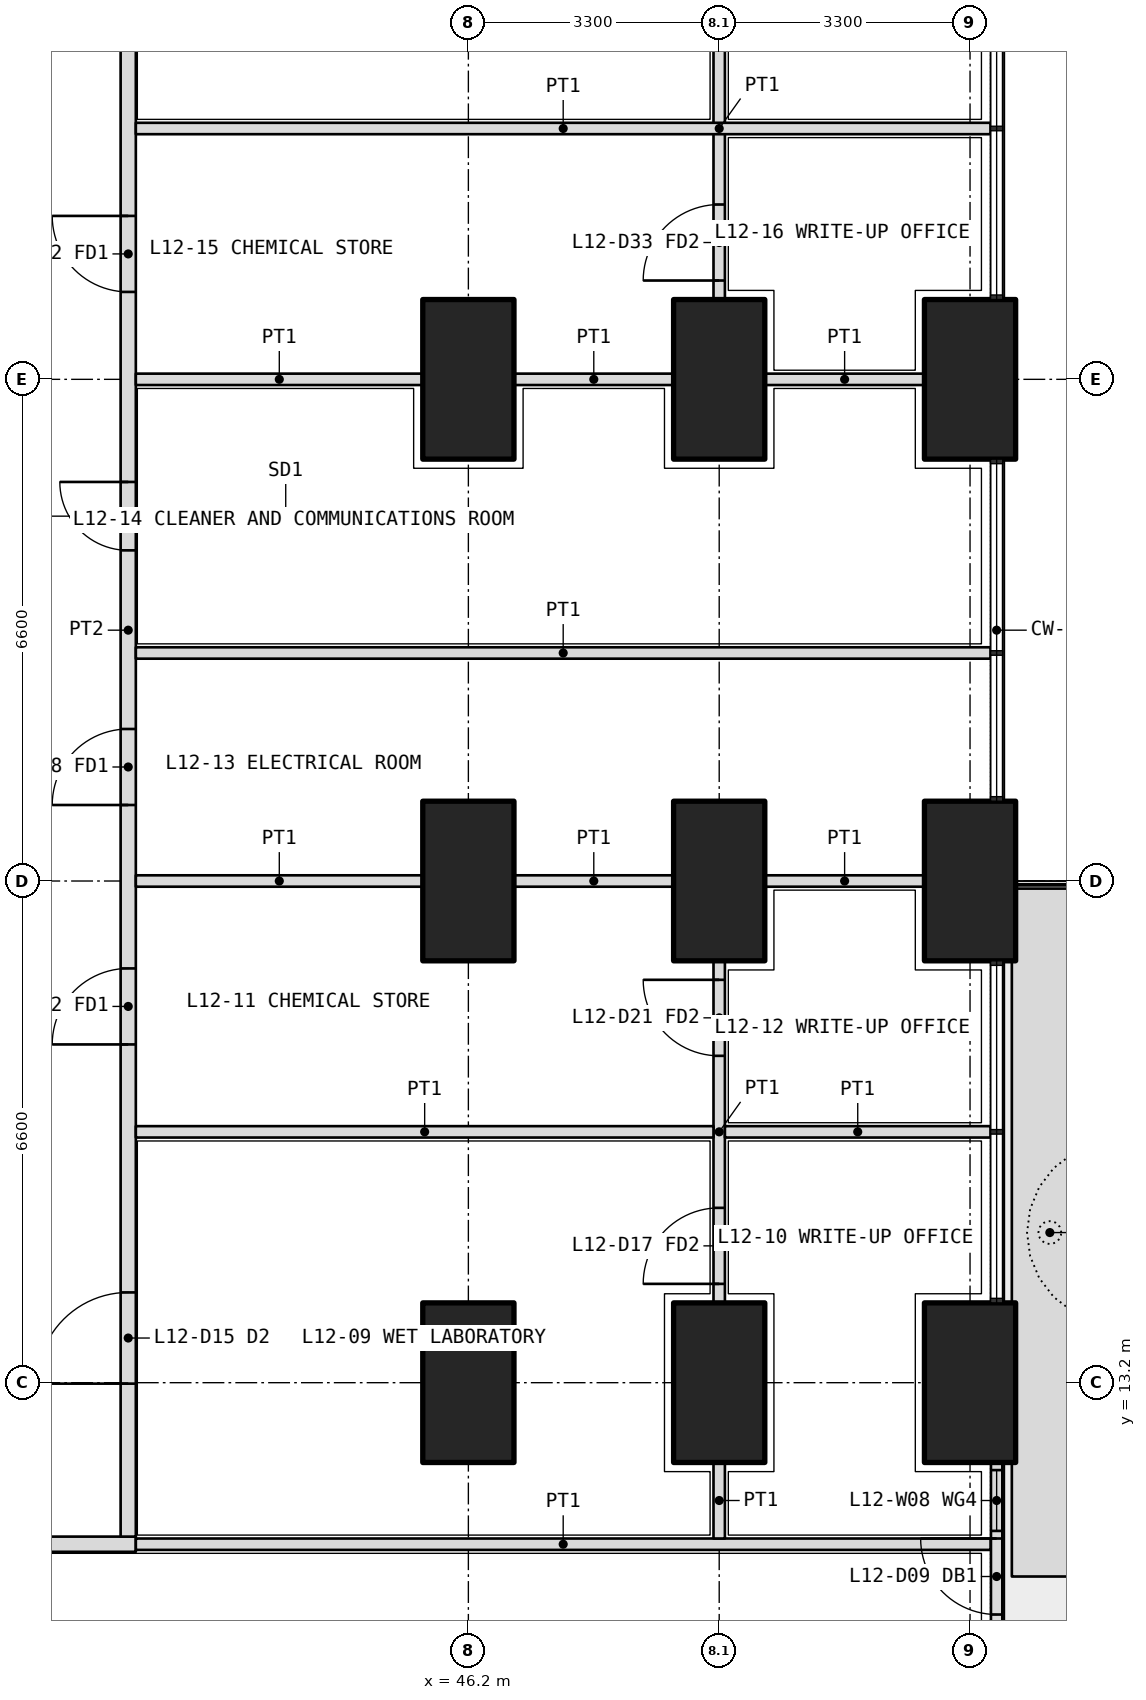
"""IFC4 building model, lengths in metres.
Left out: names, types, materials, properties, quantities, classifications, styles, units other than length and angle.
Written with IfcOpenShell. Run it as: python <this file> out.ifc"""

import sys

from ifc_helpers import new_model, si_unit, direction, frame, frame_2d, origin, origin_2d, place, context, subcontext, project, spatial, polyline, rectangle, outline, extrude, element, fill, save


model = new_model("IFC4")
c1 = context("Model", 3, precision=1e-05, world=origin(), true_north=direction((0.0, 1.0)))
c2 = subcontext(c1, "Body", "Model", "MODEL_VIEW")
j1 = project(units=[si_unit("LENGTHUNIT", "METRE"), si_unit("PLANEANGLEUNIT", "RADIAN")], contexts=[c1])
p1 = place(None, origin())
s1 = spatial("IfcSite", under=j1, at=p1, CompositionType="ELEMENT")
p2 = place(p1, origin())
s2 = spatial("IfcBuilding", under=s1, at=p2, CompositionType="ELEMENT")
p3 = place(p2, frame((0.0, 0.0, 54.9)))
s3 = spatial("IfcBuildingStorey", under=s2, at=p3, CompositionType="ELEMENT", Elevation=54.9)
for number, where, z_axis, x_axis in (
    (1, (52.8, 13.2, 0.0), (0.0, 0.0, 1.0), (0.0, 1.0, 0.0)),
    (2, (52.8, 19.8, 0.0), (0.0, 0.0, 1.0), (0.0, 1.0, 0.0)),
    (3, (52.8, 26.4, 0.0), (0.0, 0.0, 1.0), (0.0, 1.0, 0.0)),
    (4, (49.5, 13.2, 0.0), (0.0, 0.0, 1.0), (0.0, 1.0, 0.0)),
    (5, (49.5, 19.8, 0.0), (0.0, 0.0, 1.0), (0.0, 1.0, 0.0)),
    (6, (49.5, 26.4, 0.0), (0.0, 0.0, 1.0), (0.0, 1.0, 0.0)),
    (7, (46.2, 13.2, 0.0), (0.0, 0.0, 1.0), (0.0, 1.0, 0.0)),
    (8, (46.2, 19.8, 0.0), (0.0, 0.0, 1.0), (0.0, 1.0, 0.0)),
    (9, (46.2, 26.4, 0.0), (0.0, 0.0, 1.0), (0.0, 1.0, 0.0)),
):
    element("IfcColumn", number, at=place(p3, frame(where, z_axis=z_axis, x_axis=x_axis)), inside=s3, PredefinedType="COLUMN", context=c2, shape_type="SweptSolid", body=[
        extrude(rectangle(XDim=2.1, YDim=1.2, at=origin_2d()), origin(), (0.0, 0.0, 1.0), 4.2),
    ])
p4 = place(p3, origin())
e10 = element("IfcWall", 10, at=p4, inside=s3, PredefinedType="USERDEFINED", context=c2, shape_type="SweptSolid", body=[
    extrude(outline(polyline([(53.35, 10.65), (54.35, 10.65), (54.35, 19.7), (53.35, 19.7), (53.35, 10.65)]), holes=[polyline([(53.5, 10.8), (54.2, 10.8), (54.2, 19.55), (53.5, 19.55), (53.5, 10.8)])]), origin(), (0.0, 0.0, 1.0), 1.05),
])
p5 = place(p3, frame((53.15, 7.65, 0.0), z_axis=(0.0, 0.0, 1.0), x_axis=(0.0, 1.0, 0.0)))
e11 = element("IfcWall", 11, at=p5, inside=s3, PredefinedType="SOLIDWALL", context=c2, shape_type="SweptSolid", body=[
    extrude(rectangle(XDim=4.5, YDim=0.15, at=frame_2d((2.25, 0.0))), origin(), (0.0, 0.0, 1.0), 2.7),
])
p6 = place(p5, frame((2.5, 0.0, 0.0)))
e12 = element("IfcOpeningElement", 12, at=p6, cuts=e11, PredefinedType="OPENING", context=c2, shape_type="SweptSolid", body=[
    extrude(rectangle(XDim=1.0, YDim=2.4, at=frame_2d((0.5, 1.2))), frame((0.0, 0.085, 0.0), z_axis=(0.0, -1.0, 0.0), x_axis=(1.0, 0.0, 0.0)), (0.0, 0.0, 1.0), 0.17),
])
p7 = place(p5, frame((0.1, 0.0, 0.1)))
e13 = element("IfcOpeningElement", 13, at=p7, cuts=e11, PredefinedType="OPENING", context=c2, shape_type="SweptSolid", body=[
    extrude(rectangle(XDim=1.9, YDim=2.3, at=frame_2d((0.95, 1.15))), frame((0.0, 0.085, 0.0), z_axis=(0.0, -1.0, 0.0), x_axis=(1.0, 0.0, 0.0)), (0.0, 0.0, 1.0), 0.17),
])
p8 = place(p5, frame((3.6, 0.0, 0.1)))
e14 = element("IfcOpeningElement", 14, at=p8, cuts=e11, PredefinedType="OPENING", context=c2, shape_type="SweptSolid", body=[
    extrude(rectangle(XDim=0.8, YDim=2.3, at=frame_2d((0.4, 1.15))), frame((0.0, 0.085, 0.0), z_axis=(0.0, -1.0, 0.0), x_axis=(1.0, 0.0, 0.0)), (0.0, 0.0, 1.0), 0.17),
])
p9 = place(p3, frame((26.4, 11.075, 0.0), z_axis=(0.0, 0.0, 1.0), x_axis=(1.0, 0.0, 0.0)))
e15 = element("IfcWall", 15, at=p9, inside=s3, PredefinedType="PARTITIONING", context=c2, shape_type="SweptSolid", body=[
    extrude(rectangle(XDim=15.425, YDim=0.2, at=frame_2d((7.712, 0.0))), origin(), (0.0, 0.0, 1.0), 2.85),
])
p10 = place(p9, frame((1.6, 0.0, 0.0)))
e16 = element("IfcOpeningElement", 16, at=p10, cuts=e15, PredefinedType="OPENING", context=c2, shape_type="SweptSolid", body=[
    extrude(rectangle(XDim=1.0, YDim=2.1, at=frame_2d((0.5, 1.05))), frame((0.0, 0.11, 0.0), z_axis=(0.0, -1.0, 0.0), x_axis=(1.0, 0.0, 0.0)), (0.0, 0.0, 1.0), 0.22),
])
p11 = place(p9, frame((4.9, 0.0, 0.0)))
e17 = element("IfcOpeningElement", 17, at=p11, cuts=e15, PredefinedType="OPENING", context=c2, shape_type="SweptSolid", body=[
    extrude(rectangle(XDim=1.0, YDim=2.1, at=frame_2d((0.5, 1.05))), frame((0.0, 0.11, 0.0), z_axis=(0.0, -1.0, 0.0), x_axis=(1.0, 0.0, 0.0)), (0.0, 0.0, 1.0), 0.22),
])
p12 = place(p9, frame((10.363, 0.0, 0.0)))
e18 = element("IfcOpeningElement", 18, at=p12, cuts=e15, PredefinedType="OPENING", context=c2, shape_type="SweptSolid", body=[
    extrude(rectangle(XDim=1.2, YDim=2.1, at=frame_2d((0.6, 1.05))), frame((0.0, 0.11, 0.0), z_axis=(0.0, -1.0, 0.0), x_axis=(1.0, 0.0, 0.0)), (0.0, 0.0, 1.0), 0.22),
])
p13 = place(p3, frame((41.725, 11.175, 0.0), z_axis=(0.0, 0.0, 1.0), x_axis=(0.0, 1.0, 0.0)))
e19 = element("IfcWall", 19, at=p13, inside=s3, PredefinedType="PARTITIONING", context=c2, shape_type="SweptSolid", body=[
    extrude(rectangle(XDim=23.85, YDim=0.2, at=frame_2d((11.925, 0.0))), origin(), (0.0, 0.0, 1.0), 2.85),
])
p14 = place(p13, frame((2.012, 0.0, 0.0)))
e20 = element("IfcOpeningElement", 20, at=p14, cuts=e19, PredefinedType="OPENING", context=c2, shape_type="SweptSolid", body=[
    extrude(rectangle(XDim=1.2, YDim=2.1, at=frame_2d((0.6, 1.05))), frame((0.0, 0.11, 0.0), z_axis=(0.0, -1.0, 0.0), x_axis=(1.0, 0.0, 0.0)), (0.0, 0.0, 1.0), 0.22),
])
p15 = place(p13, frame((6.475, 0.0, 0.0)))
e21 = element("IfcOpeningElement", 21, at=p15, cuts=e19, PredefinedType="OPENING", context=c2, shape_type="SweptSolid", body=[
    extrude(rectangle(XDim=1.0, YDim=2.1, at=frame_2d((0.5, 1.05))), frame((0.0, 0.11, 0.0), z_axis=(0.0, -1.0, 0.0), x_axis=(1.0, 0.0, 0.0)), (0.0, 0.0, 1.0), 0.22),
])
p16 = place(p13, frame((9.625, 0.0, 0.0)))
e22 = element("IfcOpeningElement", 22, at=p16, cuts=e19, PredefinedType="OPENING", context=c2, shape_type="SweptSolid", body=[
    extrude(rectangle(XDim=1.0, YDim=2.1, at=frame_2d((0.5, 1.05))), frame((0.0, 0.11, 0.0), z_axis=(0.0, -1.0, 0.0), x_axis=(1.0, 0.0, 0.0)), (0.0, 0.0, 1.0), 0.22),
])
p17 = place(p13, frame((12.975, 0.0, 0.0)))
e23 = element("IfcOpeningElement", 23, at=p17, cuts=e19, PredefinedType="OPENING", context=c2, shape_type="SweptSolid", body=[
    extrude(rectangle(XDim=0.9, YDim=2.1, at=frame_2d((0.45, 1.05))), frame((0.0, 0.11, 0.0), z_axis=(0.0, -1.0, 0.0), x_axis=(1.0, 0.0, 0.0)), (0.0, 0.0, 1.0), 0.22),
])
p18 = place(p13, frame((16.375, 0.0, 0.0)))
e24 = element("IfcOpeningElement", 24, at=p18, cuts=e19, PredefinedType="OPENING", context=c2, shape_type="SweptSolid", body=[
    extrude(rectangle(XDim=1.0, YDim=2.1, at=frame_2d((0.5, 1.05))), frame((0.0, 0.11, 0.0), z_axis=(0.0, -1.0, 0.0), x_axis=(1.0, 0.0, 0.0)), (0.0, 0.0, 1.0), 0.22),
])
p19 = place(p13, frame((20.738, 0.0, 0.0)))
e25 = element("IfcOpeningElement", 25, at=p19, cuts=e19, PredefinedType="OPENING", context=c2, shape_type="SweptSolid", body=[
    extrude(rectangle(XDim=1.0, YDim=2.1, at=frame_2d((0.5, 1.05))), frame((0.0, 0.11, 0.0), z_axis=(0.0, -1.0, 0.0), x_axis=(1.0, 0.0, 0.0)), (0.0, 0.0, 1.0), 0.22),
])
p20 = place(p3, frame((53.07, 11.075, 0.0), z_axis=(0.0, 0.0, 1.0), x_axis=(-1.0, 0.0, 0.0)))
e26 = element("IfcWall", 26, at=p20, inside=s3, PredefinedType="PARTITIONING", context=c2, shape_type="SweptSolid", body=[
    extrude(rectangle(XDim=11.245, YDim=0.15, at=frame_2d((5.623, 0.0))), origin(), (0.0, 0.0, 1.0), 2.7),
])
p21 = place(p3, frame((49.5, 11.15, 0.0), z_axis=(0.0, 0.0, 1.0), x_axis=(0.0, 1.0, 0.0)))
e27 = element("IfcWall", 27, at=p21, inside=s3, PredefinedType="PARTITIONING", context=c2, shape_type="SweptSolid", body=[
    extrude(rectangle(XDim=1.0, YDim=0.15, at=frame_2d((0.5, 0.0))), origin(), (0.0, 0.0, 1.0), 3.9),
])
p22 = place(p3, frame((49.5, 14.25, 0.0), z_axis=(0.0, 0.0, 1.0), x_axis=(0.0, 1.0, 0.0)))
e28 = element("IfcWall", 28, at=p22, inside=s3, PredefinedType="PARTITIONING", context=c2, shape_type="SweptSolid", body=[
    extrude(rectangle(XDim=4.5, YDim=0.15, at=frame_2d((2.25, 0.0))), origin(), (0.0, 0.0, 1.0), 3.9),
])
p23 = place(p22, frame((0.25, 0.0, 0.0)))
e29 = element("IfcOpeningElement", 29, at=p23, cuts=e28, PredefinedType="OPENING", context=c2, shape_type="SweptSolid", body=[
    extrude(rectangle(XDim=1.0, YDim=2.1, at=frame_2d((0.5, 1.05))), frame((0.0, 0.085, 0.0), z_axis=(0.0, -1.0, 0.0), x_axis=(1.0, 0.0, 0.0)), (0.0, 0.0, 1.0), 0.17),
])
p24 = place(p22, frame((3.25, 0.0, 0.0)))
e30 = element("IfcOpeningElement", 30, at=p24, cuts=e28, PredefinedType="OPENING", context=c2, shape_type="SweptSolid", body=[
    extrude(rectangle(XDim=1.0, YDim=2.1, at=frame_2d((0.5, 1.05))), frame((0.0, 0.085, 0.0), z_axis=(0.0, -1.0, 0.0), x_axis=(1.0, 0.0, 0.0)), (0.0, 0.0, 1.0), 0.17),
])
p25 = place(p3, frame((49.5, 27.45, 0.0), z_axis=(0.0, 0.0, 1.0), x_axis=(0.0, 1.0, 0.0)))
e31 = element("IfcWall", 31, at=p25, inside=s3, PredefinedType="PARTITIONING", context=c2, shape_type="SweptSolid", body=[
    extrude(rectangle(XDim=4.5, YDim=0.15, at=frame_2d((2.25, 0.0))), origin(), (0.0, 0.0, 1.0), 3.9),
])
p26 = place(p25, frame((0.25, 0.0, 0.0)))
e32 = element("IfcOpeningElement", 32, at=p26, cuts=e31, PredefinedType="OPENING", context=c2, shape_type="SweptSolid", body=[
    extrude(rectangle(XDim=1.0, YDim=2.1, at=frame_2d((0.5, 1.05))), frame((0.0, 0.085, 0.0), z_axis=(0.0, -1.0, 0.0), x_axis=(1.0, 0.0, 0.0)), (0.0, 0.0, 1.0), 0.17),
])
p27 = place(p3, frame((53.07, 22.8, 0.0), z_axis=(0.0, 0.0, 1.0), x_axis=(-1.0, 0.0, 0.0)))
e33 = element("IfcWall", 33, at=p27, inside=s3, PredefinedType="PARTITIONING", context=c2, shape_type="SweptSolid", body=[
    extrude(rectangle(XDim=11.245, YDim=0.15, at=frame_2d((5.623, 0.0))), origin(), (0.0, 0.0, 1.0), 2.7),
])
for number, where, z_axis, x_axis in (
    (34, (52.2, 26.4, 0.0), (0.0, 0.0, 1.0), (-1.0, 0.0, 0.0)),
    (35, (48.9, 26.4, 0.0), (0.0, 0.0, 1.0), (-1.0, 0.0, 0.0)),
):
    element("IfcWall", number, at=place(p3, frame(where, z_axis=z_axis, x_axis=x_axis)), inside=s3, PredefinedType="PARTITIONING", context=c2, shape_type="SweptSolid", body=[
        extrude(rectangle(XDim=2.1, YDim=0.15, at=frame_2d((1.05, 0.0))), origin(), (0.0, 0.0, 1.0), 2.85),
    ])
p28 = place(p3, frame((45.6, 26.4, 0.0), z_axis=(0.0, 0.0, 1.0), x_axis=(-1.0, 0.0, 0.0)))
e36 = element("IfcWall", 36, at=p28, inside=s3, PredefinedType="PARTITIONING", context=c2, shape_type="SweptSolid", body=[
    extrude(rectangle(XDim=3.775, YDim=0.15, at=frame_2d((1.888, 0.0))), origin(), (0.0, 0.0, 1.0), 2.85),
])
p29 = place(p3, frame((53.07, 16.5, 0.0), z_axis=(0.0, 0.0, 1.0), x_axis=(-1.0, 0.0, 0.0)))
e37 = element("IfcWall", 37, at=p29, inside=s3, PredefinedType="PARTITIONING", context=c2, shape_type="SweptSolid", body=[
    extrude(rectangle(XDim=3.495, YDim=0.15, at=frame_2d((1.748, 0.0))), origin(), (0.0, 0.0, 1.0), 2.7),
])
p30 = place(p3, frame((49.425, 16.5, 0.0), z_axis=(0.0, 0.0, 1.0), x_axis=(-1.0, 0.0, 0.0)))
e38 = element("IfcWall", 38, at=p30, inside=s3, PredefinedType="PARTITIONING", context=c2, shape_type="SweptSolid", body=[
    extrude(rectangle(XDim=7.6, YDim=0.15, at=frame_2d((3.8, 0.0))), origin(), (0.0, 0.0, 1.0), 3.9),
])
for number, where, z_axis, x_axis in (
    (39, (52.2, 19.8, 0.0), (0.0, 0.0, 1.0), (-1.0, 0.0, 0.0)),
    (40, (48.9, 19.8, 0.0), (0.0, 0.0, 1.0), (-1.0, 0.0, 0.0)),
):
    element("IfcWall", number, at=place(p3, frame(where, z_axis=z_axis, x_axis=x_axis)), inside=s3, PredefinedType="PARTITIONING", context=c2, shape_type="SweptSolid", body=[
        extrude(rectangle(XDim=2.1, YDim=0.15, at=frame_2d((1.05, 0.0))), origin(), (0.0, 0.0, 1.0), 2.85),
    ])
p31 = place(p3, frame((45.6, 19.8, 0.0), z_axis=(0.0, 0.0, 1.0), x_axis=(-1.0, 0.0, 0.0)))
e41 = element("IfcWall", 41, at=p31, inside=s3, PredefinedType="PARTITIONING", context=c2, shape_type="SweptSolid", body=[
    extrude(rectangle(XDim=3.775, YDim=0.15, at=frame_2d((1.888, 0.0))), origin(), (0.0, 0.0, 1.0), 2.85),
])
p32 = place(p3, frame((53.07, 29.7, 0.0), z_axis=(0.0, 0.0, 1.0), x_axis=(-1.0, 0.0, 0.0)))
e42 = element("IfcWall", 42, at=p32, inside=s3, PredefinedType="PARTITIONING", context=c2, shape_type="SweptSolid", body=[
    extrude(rectangle(XDim=11.245, YDim=0.15, at=frame_2d((5.623, 0.0))), origin(), (0.0, 0.0, 1.0), 2.7),
])
p33 = place(p6, origin())
e43 = element("IfcDoor", 43, at=p33, inside=s3, OperationType="SINGLE_SWING_RIGHT", PredefinedType="DOOR", context=c2, shape_type="SweptSolid", body=[
    extrude(rectangle(XDim=1.0, YDim=2.4, at=frame_2d((0.5, 1.2))), frame((0.0, 0.025, 0.0), z_axis=(0.0, -1.0, 0.0), x_axis=(1.0, 0.0, 0.0)), (0.0, 0.0, 1.0), 0.05),
])
fill(e12, e43)
p34 = place(p8, origin())
e44 = element("IfcWindow", 44, at=p34, inside=s3, PartitioningType="SINGLE_PANEL", PredefinedType="WINDOW", context=c2, shape_type="SweptSolid", body=[
    extrude(rectangle(XDim=0.8, YDim=2.3, at=frame_2d((0.4, 1.15))), frame((0.0, 0.03, 0.0), z_axis=(0.0, -1.0, 0.0), x_axis=(1.0, 0.0, 0.0)), (0.0, 0.0, 1.0), 0.06),
])
fill(e14, e44)
p35 = place(p14, origin())
e45 = element("IfcDoor", 45, at=p35, inside=s3, OperationType="DOUBLE_DOOR_SINGLE_SWING", PredefinedType="DOOR", context=c2, shape_type="SweptSolid", body=[
    extrude(rectangle(XDim=1.2, YDim=2.1, at=frame_2d((0.6, 1.05))), frame((0.0, 0.025, 0.0), z_axis=(0.0, -1.0, 0.0), x_axis=(1.0, 0.0, 0.0)), (0.0, 0.0, 1.0), 0.05),
])
fill(e20, e45)
p36 = place(p23, origin())
e46 = element("IfcDoor", 46, at=p36, inside=s3, OperationType="SINGLE_SWING_LEFT", PredefinedType="DOOR", context=c2, shape_type="SweptSolid", body=[
    extrude(rectangle(XDim=1.0, YDim=2.1, at=frame_2d((0.5, 1.05))), frame((0.0, 0.025, 0.0), z_axis=(0.0, -1.0, 0.0), x_axis=(1.0, 0.0, 0.0)), (0.0, 0.0, 1.0), 0.05),
])
fill(e29, e46)
p37 = place(p15, origin())
e47 = element("IfcDoor", 47, at=p37, inside=s3, OperationType="SINGLE_SWING_LEFT", PredefinedType="DOOR", context=c2, shape_type="SweptSolid", body=[
    extrude(rectangle(XDim=1.0, YDim=2.1, at=frame_2d((0.5, 1.05))), frame((0.0, 0.025, 0.0), z_axis=(0.0, -1.0, 0.0), x_axis=(1.0, 0.0, 0.0)), (0.0, 0.0, 1.0), 0.05),
])
fill(e21, e47)
p38 = place(p24, origin())
e48 = element("IfcDoor", 48, at=p38, inside=s3, OperationType="SINGLE_SWING_RIGHT", PredefinedType="DOOR", context=c2, shape_type="SweptSolid", body=[
    extrude(rectangle(XDim=1.0, YDim=2.1, at=frame_2d((0.5, 1.05))), frame((0.0, 0.025, 0.0), z_axis=(0.0, -1.0, 0.0), x_axis=(1.0, 0.0, 0.0)), (0.0, 0.0, 1.0), 0.05),
])
fill(e30, e48)
p39 = place(p16, origin())
e49 = element("IfcDoor", 49, at=p39, inside=s3, OperationType="SINGLE_SWING_LEFT", PredefinedType="DOOR", context=c2, shape_type="SweptSolid", body=[
    extrude(rectangle(XDim=1.0, YDim=2.1, at=frame_2d((0.5, 1.05))), frame((0.0, 0.025, 0.0), z_axis=(0.0, -1.0, 0.0), x_axis=(1.0, 0.0, 0.0)), (0.0, 0.0, 1.0), 0.05),
])
fill(e22, e49)
p40 = place(p17, origin())
e50 = element("IfcDoor", 50, at=p40, inside=s3, OperationType="SINGLE_SWING_RIGHT", PredefinedType="DOOR", context=c2, shape_type="SweptSolid", body=[
    extrude(rectangle(XDim=0.9, YDim=2.1, at=frame_2d((0.45, 1.05))), frame((0.0, 0.025, 0.0), z_axis=(0.0, -1.0, 0.0), x_axis=(1.0, 0.0, 0.0)), (0.0, 0.0, 1.0), 0.05),
])
fill(e23, e50)
p41 = place(p18, origin())
e51 = element("IfcDoor", 51, at=p41, inside=s3, OperationType="SINGLE_SWING_RIGHT", PredefinedType="DOOR", context=c2, shape_type="SweptSolid", body=[
    extrude(rectangle(XDim=1.0, YDim=2.1, at=frame_2d((0.5, 1.05))), frame((0.0, 0.025, 0.0), z_axis=(0.0, -1.0, 0.0), x_axis=(1.0, 0.0, 0.0)), (0.0, 0.0, 1.0), 0.05),
])
fill(e24, e51)
p42 = place(p26, origin())
e52 = element("IfcDoor", 52, at=p42, inside=s3, OperationType="SINGLE_SWING_LEFT", PredefinedType="DOOR", context=c2, shape_type="SweptSolid", body=[
    extrude(rectangle(XDim=1.0, YDim=2.1, at=frame_2d((0.5, 1.05))), frame((0.0, 0.025, 0.0), z_axis=(0.0, -1.0, 0.0), x_axis=(1.0, 0.0, 0.0)), (0.0, 0.0, 1.0), 0.05),
])
fill(e32, e52)
save(model, sys.argv[1])
